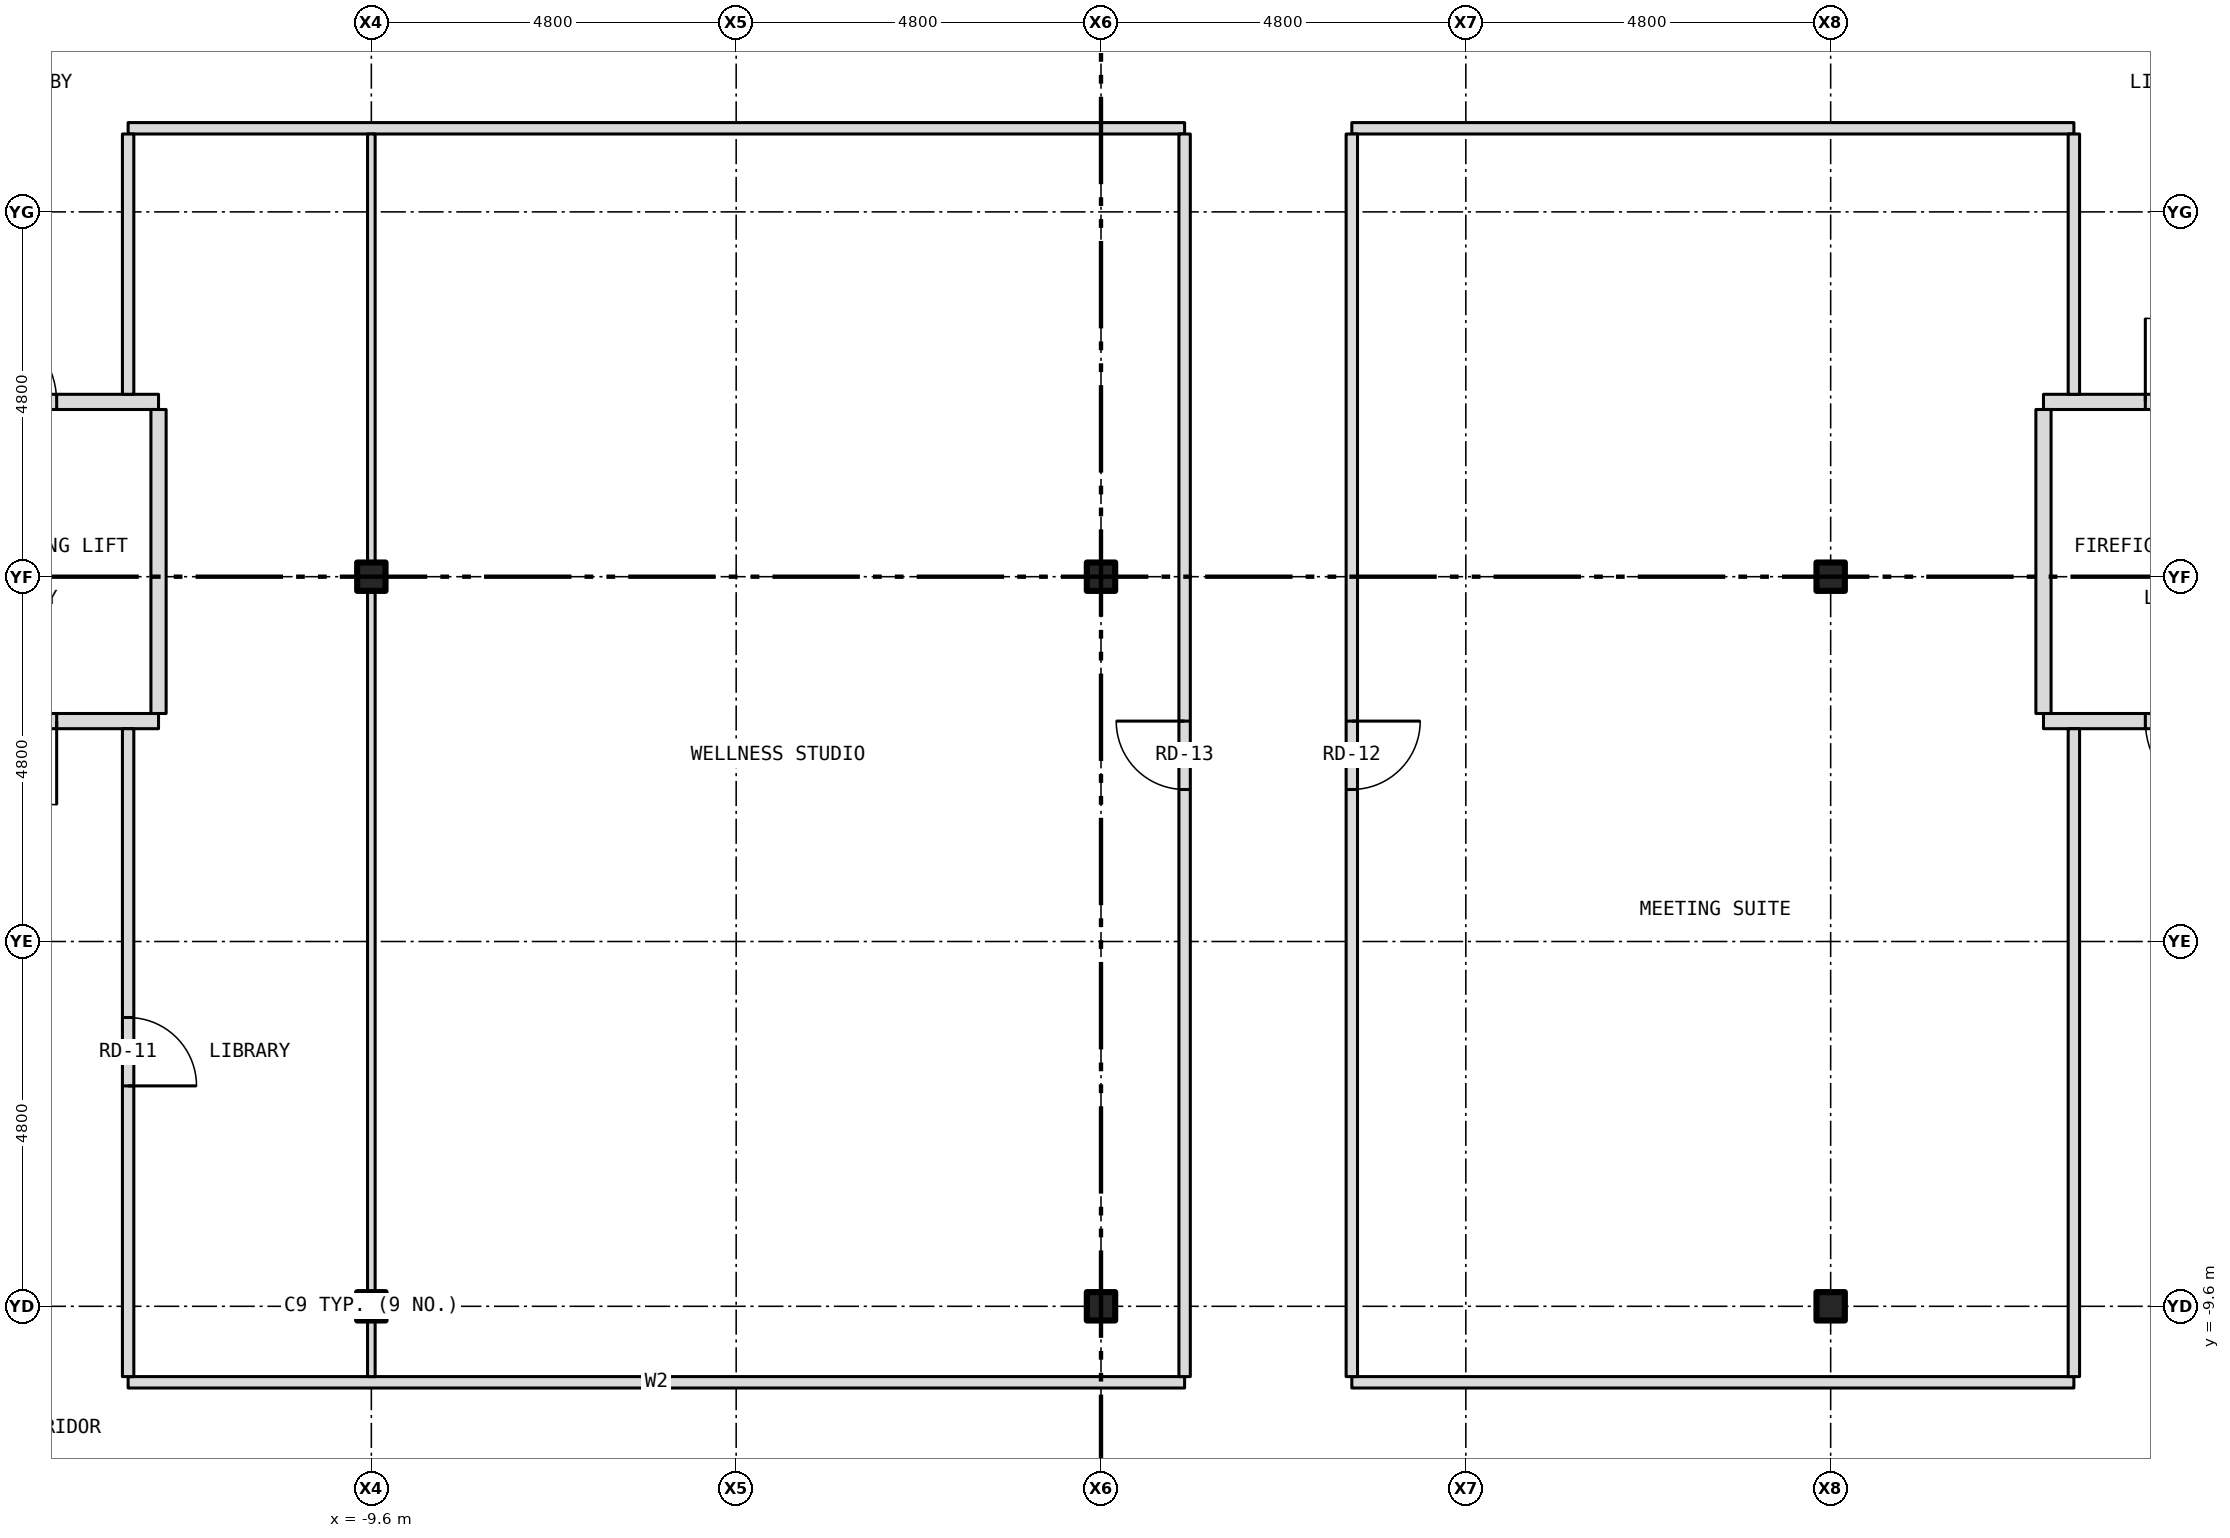
"""IFC4 building model, lengths in metres.
Left out: names, types, materials, properties, quantities, classifications, styles, units other than length and angle.
Written with IfcOpenShell. Run it as: python <this file> out.ifc"""

import sys

from ifc_helpers import new_model, si_unit, direction, frame, frame_2d, origin, origin_2d, place, context, subcontext, project, spatial, rectangle, i_section, extrude, element, fill, save


model = new_model("IFC4")
c1 = context("Model", 3, precision=1e-05, world=origin(), true_north=direction((0.0, 1.0)))
c2 = subcontext(c1, "Body", "Model", "MODEL_VIEW")
j1 = project(units=[si_unit("LENGTHUNIT", "METRE"), si_unit("PLANEANGLEUNIT", "RADIAN")], contexts=[c1])
p1 = place(None, origin())
s1 = spatial("IfcSite", under=j1, at=p1, CompositionType="ELEMENT")
p2 = place(p1, origin())
s2 = spatial("IfcBuilding", under=s1, at=p2, CompositionType="ELEMENT")
p3 = place(p2, frame((0.0, 0.0, 215.5)))
s3 = spatial("IfcBuildingStorey", under=s2, at=p3, CompositionType="ELEMENT", Elevation=215.5)
for number, where, z_axis, x_axis in (
    (1, (-9.6, -9.6, -0.15), (0.0, 0.0, 1.0), (1.0, 0.0, 0.0)),
    (2, (-9.6, 0.0, -0.15), (0.0, 0.0, 1.0), (1.0, 0.0, 0.0)),
    (3, (0.0, -9.6, -0.15), (0.0, 0.0, 1.0), (1.0, 0.0, 0.0)),
    (4, (0.0, 0.0, -0.15), (0.0, 0.0, 1.0), (1.0, 0.0, 0.0)),
    (5, (9.6, -9.6, -0.15), (0.0, 0.0, 1.0), (1.0, 0.0, 0.0)),
    (6, (9.6, 0.0, -0.15), (0.0, 0.0, 1.0), (1.0, 0.0, 0.0)),
):
    element("IfcColumn", number, at=place(p3, frame(where, z_axis=z_axis, x_axis=x_axis)), inside=s3, PredefinedType="COLUMN", context=c2, shape_type="SweptSolid", body=[
        extrude(i_section(OverallWidth=0.373, OverallDepth=0.373, WebThickness=0.016, FlangeThickness=0.026, at=origin_2d()), origin(), (0.0, 0.0, 1.0), 3.5),
    ])
p4 = place(p3, frame((-12.8, -10.6, 0.0), z_axis=(0.0, 0.0, 1.0), x_axis=(1.0, 0.0, 0.0)))
e7 = element("IfcWall", 7, at=p4, inside=s3, PredefinedType="PARTITIONING", context=c2, shape_type="SweptSolid", body=[
    extrude(rectangle(XDim=13.9, YDim=0.15, at=frame_2d((6.95, 0.0))), origin(), (0.0, 0.0, 1.0), 3.35),
])
p5 = place(p3, frame((3.3, -10.6, 0.0), z_axis=(0.0, 0.0, 1.0), x_axis=(1.0, 0.0, 0.0)))
e8 = element("IfcWall", 8, at=p5, inside=s3, PredefinedType="PARTITIONING", context=c2, shape_type="SweptSolid", body=[
    extrude(rectangle(XDim=9.5, YDim=0.15, at=frame_2d((4.75, 0.0))), origin(), (0.0, 0.0, 1.0), 3.35),
])
p6 = place(p3, frame((-15.68, -1.9, 0.0), z_axis=(0.0, 0.0, 1.0), x_axis=(1.0, 0.0, 0.0)))
e9 = element("IfcWall", 9, at=p6, inside=s3, PredefinedType="PARTITIONING", context=c2, shape_type="SweptSolid", body=[
    extrude(rectangle(XDim=3.28, YDim=0.2, at=frame_2d((1.64, 0.0))), origin(), (0.0, 0.0, 1.0), 3.35),
])
p7 = place(p6, frame((0.84, 0.0, 0.0)))
e10 = element("IfcOpeningElement", 10, at=p7, cuts=e9, PredefinedType="OPENING", context=c2, shape_type="SweptSolid", body=[
    extrude(rectangle(XDim=1.1, YDim=2.1, at=frame_2d((0.55, 1.05))), frame((0.0, 0.112, 0.0), z_axis=(0.0, -1.0, 0.0), x_axis=(1.0, 0.0, 0.0)), (0.0, 0.0, 1.0), 0.224),
])
p8 = place(p3, frame((12.4, -1.9, 0.0), z_axis=(0.0, 0.0, 1.0), x_axis=(1.0, 0.0, 0.0)))
e11 = element("IfcWall", 11, at=p8, inside=s3, PredefinedType="PARTITIONING", context=c2, shape_type="SweptSolid", body=[
    extrude(rectangle(XDim=3.28, YDim=0.2, at=frame_2d((1.64, 0.0))), origin(), (0.0, 0.0, 1.0), 3.35),
])
p9 = place(p8, frame((1.34, 0.0, 0.0)))
e12 = element("IfcOpeningElement", 12, at=p9, cuts=e11, PredefinedType="OPENING", context=c2, shape_type="SweptSolid", body=[
    extrude(rectangle(XDim=1.1, YDim=2.1, at=frame_2d((0.55, 1.05))), frame((0.0, 0.112, 0.0), z_axis=(0.0, -1.0, 0.0), x_axis=(1.0, 0.0, 0.0)), (0.0, 0.0, 1.0), 0.224),
])
p10 = place(p3, frame((-15.68, 2.3, 0.0), z_axis=(0.0, 0.0, 1.0), x_axis=(1.0, 0.0, 0.0)))
e13 = element("IfcWall", 13, at=p10, inside=s3, PredefinedType="PARTITIONING", context=c2, shape_type="SweptSolid", body=[
    extrude(rectangle(XDim=3.28, YDim=0.2, at=frame_2d((1.64, 0.0))), origin(), (0.0, 0.0, 1.0), 3.35),
])
p11 = place(p10, frame((0.84, 0.0, 0.0)))
e14 = element("IfcOpeningElement", 14, at=p11, cuts=e13, PredefinedType="OPENING", context=c2, shape_type="SweptSolid", body=[
    extrude(rectangle(XDim=1.1, YDim=2.1, at=frame_2d((0.55, 1.05))), frame((0.0, 0.112, 0.0), z_axis=(0.0, -1.0, 0.0), x_axis=(1.0, 0.0, 0.0)), (0.0, 0.0, 1.0), 0.224),
])
p12 = place(p3, frame((12.4, 2.3, 0.0), z_axis=(0.0, 0.0, 1.0), x_axis=(1.0, 0.0, 0.0)))
e15 = element("IfcWall", 15, at=p12, inside=s3, PredefinedType="PARTITIONING", context=c2, shape_type="SweptSolid", body=[
    extrude(rectangle(XDim=3.28, YDim=0.2, at=frame_2d((1.64, 0.0))), origin(), (0.0, 0.0, 1.0), 3.35),
])
p13 = place(p12, frame((1.34, 0.0, 0.0)))
e16 = element("IfcOpeningElement", 16, at=p13, cuts=e15, PredefinedType="OPENING", context=c2, shape_type="SweptSolid", body=[
    extrude(rectangle(XDim=1.1, YDim=2.1, at=frame_2d((0.55, 1.05))), frame((0.0, 0.112, 0.0), z_axis=(0.0, -1.0, 0.0), x_axis=(1.0, 0.0, 0.0)), (0.0, 0.0, 1.0), 0.224),
])
p14 = place(p3, frame((-12.8, 5.9, 0.0), z_axis=(0.0, 0.0, 1.0), x_axis=(1.0, 0.0, 0.0)))
e17 = element("IfcWall", 17, at=p14, inside=s3, PredefinedType="PARTITIONING", context=c2, shape_type="SweptSolid", body=[
    extrude(rectangle(XDim=13.9, YDim=0.15, at=frame_2d((6.95, 0.0))), origin(), (0.0, 0.0, 1.0), 3.35),
])
p15 = place(p3, frame((3.3, 5.9, 0.0), z_axis=(0.0, 0.0, 1.0), x_axis=(1.0, 0.0, 0.0)))
e18 = element("IfcWall", 18, at=p15, inside=s3, PredefinedType="PARTITIONING", context=c2, shape_type="SweptSolid", body=[
    extrude(rectangle(XDim=9.5, YDim=0.15, at=frame_2d((4.75, 0.0))), origin(), (0.0, 0.0, 1.0), 3.35),
])
p16 = place(p3, frame((-12.8, -10.525, 0.0), z_axis=(0.0, 0.0, 1.0), x_axis=(0.0, 1.0, 0.0)))
e19 = element("IfcWall", 19, at=p16, inside=s3, PredefinedType="PARTITIONING", context=c2, shape_type="SweptSolid", body=[
    extrude(rectangle(XDim=8.525, YDim=0.15, at=frame_2d((4.262, 0.0))), origin(), (0.0, 0.0, 1.0), 3.35),
])
p17 = place(p16, frame((3.825, 0.0, 0.0)))
e20 = element("IfcOpeningElement", 20, at=p17, cuts=e19, PredefinedType="OPENING", context=c2, shape_type="SweptSolid", body=[
    extrude(rectangle(XDim=0.9, YDim=2.1, at=frame_2d((0.45, 1.05))), frame((0.0, 0.087, 0.0), z_axis=(0.0, -1.0, 0.0), x_axis=(1.0, 0.0, 0.0)), (0.0, 0.0, 1.0), 0.174),
])
p18 = place(p3, frame((-12.8, 2.4, 0.0), z_axis=(0.0, 0.0, 1.0), x_axis=(0.0, 1.0, 0.0)))
e21 = element("IfcWall", 21, at=p18, inside=s3, PredefinedType="PARTITIONING", context=c2, shape_type="SweptSolid", body=[
    extrude(rectangle(XDim=3.425, YDim=0.15, at=frame_2d((1.712, 0.0))), origin(), (0.0, 0.0, 1.0), 3.35),
])
p19 = place(p3, frame((-12.4, -1.8, 0.0), z_axis=(0.0, 0.0, 1.0), x_axis=(0.0, 1.0, 0.0)))
e22 = element("IfcWall", 22, at=p19, inside=s3, PredefinedType="PARTITIONING", context=c2, shape_type="SweptSolid", body=[
    extrude(rectangle(XDim=4.0, YDim=0.2, at=frame_2d((2.0, 0.0))), origin(), (0.0, 0.0, 1.0), 3.35),
])
p20 = place(p3, frame((-9.6, -10.525, 0.0), z_axis=(0.0, 0.0, 1.0), x_axis=(0.0, 1.0, 0.0)))
e23 = element("IfcWall", 23, at=p20, inside=s3, PredefinedType="PARTITIONING", context=c2, shape_type="SweptSolid", body=[
    extrude(rectangle(XDim=0.738, YDim=0.1, at=frame_2d((0.369, 0.0))), origin(), (0.0, 0.0, 1.0), 2.728),
])
p21 = place(p3, frame((-9.6, -9.787, 0.0), z_axis=(0.0, 0.0, 1.0), x_axis=(0.0, 1.0, 0.0)))
e24 = element("IfcWall", 24, at=p21, inside=s3, PredefinedType="PARTITIONING", context=c2, shape_type="SweptSolid", body=[
    extrude(rectangle(XDim=0.374, YDim=0.1, at=frame_2d((0.187, 0.0))), origin(), (0.0, 0.0, 1.0), 3.35),
])
p22 = place(p3, frame((-9.6, -9.413, 0.0), z_axis=(0.0, 0.0, 1.0), x_axis=(0.0, 1.0, 0.0)))
e25 = element("IfcWall", 25, at=p22, inside=s3, PredefinedType="PARTITIONING", context=c2, shape_type="SweptSolid", body=[
    extrude(rectangle(XDim=9.226, YDim=0.1, at=frame_2d((4.613, 0.0))), origin(), (0.0, 0.0, 1.0), 2.728),
])
p23 = place(p3, frame((-9.6, -0.187, 0.0), z_axis=(0.0, 0.0, 1.0), x_axis=(0.0, 1.0, 0.0)))
e26 = element("IfcWall", 26, at=p23, inside=s3, PredefinedType="PARTITIONING", context=c2, shape_type="SweptSolid", body=[
    extrude(rectangle(XDim=0.374, YDim=0.1, at=frame_2d((0.187, 0.0))), origin(), (0.0, 0.0, 1.0), 3.35),
])
p24 = place(p3, frame((-9.6, 0.187, 0.0), z_axis=(0.0, 0.0, 1.0), x_axis=(0.0, 1.0, 0.0)))
e27 = element("IfcWall", 27, at=p24, inside=s3, PredefinedType="PARTITIONING", context=c2, shape_type="SweptSolid", body=[
    extrude(rectangle(XDim=5.638, YDim=0.1, at=frame_2d((2.819, 0.0))), origin(), (0.0, 0.0, 1.0), 2.728),
])
p25 = place(p3, frame((1.1, -10.525, 0.0), z_axis=(0.0, 0.0, 1.0), x_axis=(0.0, 1.0, 0.0)))
e28 = element("IfcWall", 28, at=p25, inside=s3, PredefinedType="PARTITIONING", context=c2, shape_type="SweptSolid", body=[
    extrude(rectangle(XDim=16.35, YDim=0.15, at=frame_2d((8.175, 0.0))), origin(), (0.0, 0.0, 1.0), 3.35),
])
p26 = place(p25, frame((7.725, 0.0, 0.0)))
e29 = element("IfcOpeningElement", 29, at=p26, cuts=e28, PredefinedType="OPENING", context=c2, shape_type="SweptSolid", body=[
    extrude(rectangle(XDim=0.9, YDim=2.1, at=frame_2d((0.45, 1.05))), frame((0.0, 0.087, 0.0), z_axis=(0.0, -1.0, 0.0), x_axis=(1.0, 0.0, 0.0)), (0.0, 0.0, 1.0), 0.174),
])
p27 = place(p3, frame((3.3, -10.525, 0.0), z_axis=(0.0, 0.0, 1.0), x_axis=(0.0, 1.0, 0.0)))
e30 = element("IfcWall", 30, at=p27, inside=s3, PredefinedType="PARTITIONING", context=c2, shape_type="SweptSolid", body=[
    extrude(rectangle(XDim=16.35, YDim=0.15, at=frame_2d((8.175, 0.0))), origin(), (0.0, 0.0, 1.0), 3.35),
])
p28 = place(p27, frame((7.725, 0.0, 0.0)))
e31 = element("IfcOpeningElement", 31, at=p28, cuts=e30, PredefinedType="OPENING", context=c2, shape_type="SweptSolid", body=[
    extrude(rectangle(XDim=0.9, YDim=2.1, at=frame_2d((0.45, 1.05))), frame((0.0, 0.087, 0.0), z_axis=(0.0, -1.0, 0.0), x_axis=(1.0, 0.0, 0.0)), (0.0, 0.0, 1.0), 0.174),
])
p29 = place(p3, frame((12.4, -1.8, 0.0), z_axis=(0.0, 0.0, 1.0), x_axis=(0.0, 1.0, 0.0)))
e32 = element("IfcWall", 32, at=p29, inside=s3, PredefinedType="PARTITIONING", context=c2, shape_type="SweptSolid", body=[
    extrude(rectangle(XDim=4.0, YDim=0.2, at=frame_2d((2.0, 0.0))), origin(), (0.0, 0.0, 1.0), 3.35),
])
p30 = place(p3, frame((12.8, -10.525, 0.0), z_axis=(0.0, 0.0, 1.0), x_axis=(0.0, 1.0, 0.0)))
e33 = element("IfcWall", 33, at=p30, inside=s3, PredefinedType="PARTITIONING", context=c2, shape_type="SweptSolid", body=[
    extrude(rectangle(XDim=8.525, YDim=0.15, at=frame_2d((4.262, 0.0))), origin(), (0.0, 0.0, 1.0), 3.35),
])
p31 = place(p3, frame((12.8, 2.4, 0.0), z_axis=(0.0, 0.0, 1.0), x_axis=(0.0, 1.0, 0.0)))
e34 = element("IfcWall", 34, at=p31, inside=s3, PredefinedType="PARTITIONING", context=c2, shape_type="SweptSolid", body=[
    extrude(rectangle(XDim=3.425, YDim=0.15, at=frame_2d((1.712, 0.0))), origin(), (0.0, 0.0, 1.0), 3.35),
])
p32 = place(p11, origin())
e35 = element("IfcDoor", 35, at=p32, inside=s3, OperationType="SINGLE_SWING_LEFT", PredefinedType="DOOR", context=c2, shape_type="SweptSolid", body=[
    extrude(rectangle(XDim=1.1, YDim=2.1, at=frame_2d((0.55, 1.05))), frame((0.0, 0.025, 0.0), z_axis=(0.0, -1.0, 0.0), x_axis=(1.0, 0.0, 0.0)), (0.0, 0.0, 1.0), 0.05),
])
fill(e14, e35)
p33 = place(p7, origin())
e36 = element("IfcDoor", 36, at=p33, inside=s3, OperationType="SINGLE_SWING_RIGHT", PredefinedType="DOOR", context=c2, shape_type="SweptSolid", body=[
    extrude(rectangle(XDim=1.1, YDim=2.1, at=frame_2d((0.55, 1.05))), frame((0.0, 0.025, 0.0), z_axis=(0.0, -1.0, 0.0), x_axis=(1.0, 0.0, 0.0)), (0.0, 0.0, 1.0), 0.05),
])
fill(e10, e36)
p34 = place(p13, origin())
e37 = element("IfcDoor", 37, at=p34, inside=s3, OperationType="SINGLE_SWING_LEFT", PredefinedType="DOOR", context=c2, shape_type="SweptSolid", body=[
    extrude(rectangle(XDim=1.1, YDim=2.1, at=frame_2d((0.55, 1.05))), frame((0.0, 0.025, 0.0), z_axis=(0.0, -1.0, 0.0), x_axis=(1.0, 0.0, 0.0)), (0.0, 0.0, 1.0), 0.05),
])
fill(e16, e37)
p35 = place(p9, origin())
e38 = element("IfcDoor", 38, at=p35, inside=s3, OperationType="SINGLE_SWING_RIGHT", PredefinedType="DOOR", context=c2, shape_type="SweptSolid", body=[
    extrude(rectangle(XDim=1.1, YDim=2.1, at=frame_2d((0.55, 1.05))), frame((0.0, 0.025, 0.0), z_axis=(0.0, -1.0, 0.0), x_axis=(1.0, 0.0, 0.0)), (0.0, 0.0, 1.0), 0.05),
])
fill(e12, e38)
p36 = place(p17, origin())
e39 = element("IfcDoor", 39, at=p36, inside=s3, OperationType="SINGLE_SWING_LEFT", PredefinedType="DOOR", context=c2, shape_type="SweptSolid", body=[
    extrude(rectangle(XDim=0.9, YDim=2.1, at=frame_2d((0.45, 1.05))), frame((0.0, 0.025, 0.0), z_axis=(0.0, -1.0, 0.0), x_axis=(1.0, 0.0, 0.0)), (0.0, 0.0, 1.0), 0.05),
])
fill(e20, e39)
p37 = place(p28, origin())
e40 = element("IfcDoor", 40, at=p37, inside=s3, OperationType="SINGLE_SWING_RIGHT", PredefinedType="DOOR", context=c2, shape_type="SweptSolid", body=[
    extrude(rectangle(XDim=0.9, YDim=2.1, at=frame_2d((0.45, 1.05))), frame((0.0, 0.025, 0.0), z_axis=(0.0, -1.0, 0.0), x_axis=(1.0, 0.0, 0.0)), (0.0, 0.0, 1.0), 0.05),
])
fill(e31, e40)
p38 = place(p26, origin())
e41 = element("IfcDoor", 41, at=p38, inside=s3, OperationType="SINGLE_SWING_RIGHT", PredefinedType="DOOR", context=c2, shape_type="SweptSolid", body=[
    extrude(rectangle(XDim=0.9, YDim=2.1, at=frame_2d((0.45, 1.05))), frame((0.0, 0.025, 0.0), z_axis=(0.0, -1.0, 0.0), x_axis=(1.0, 0.0, 0.0)), (0.0, 0.0, 1.0), 0.05),
])
fill(e29, e41)
save(model, sys.argv[1])
